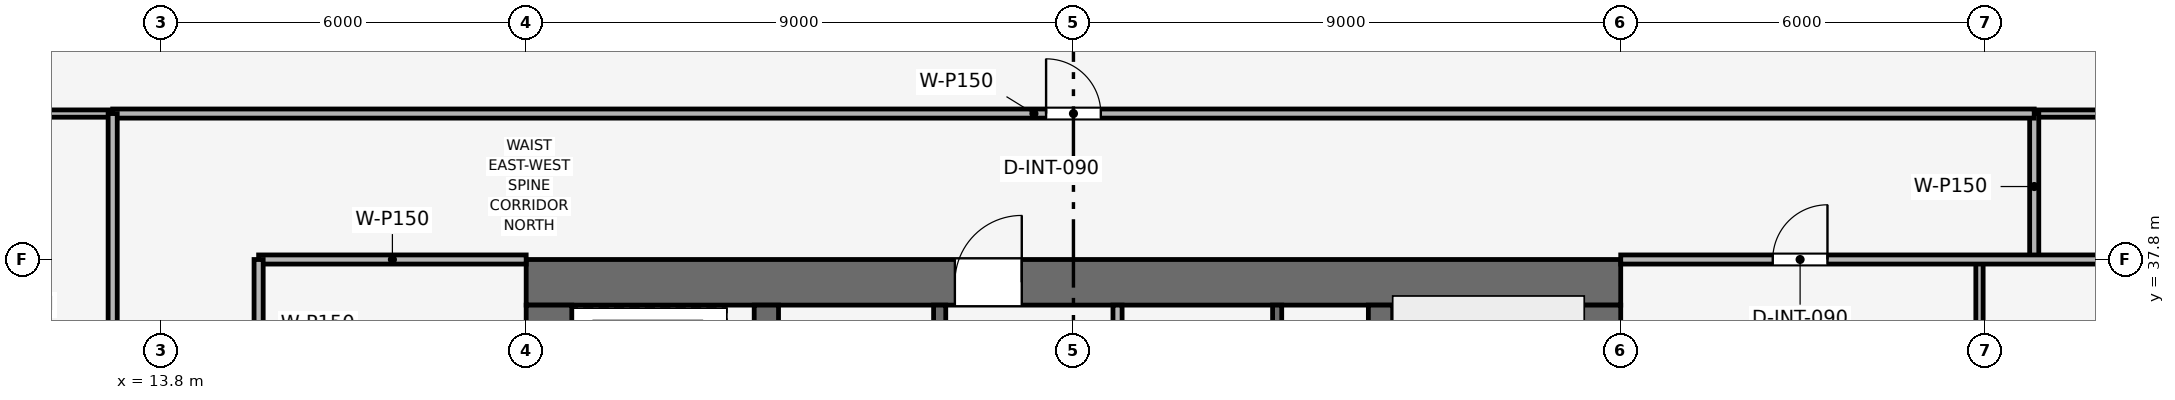
"""IFC4 building model, lengths in metres.
Left out: names, types, materials, properties, quantities, classifications, styles, units other than length and angle.
Written with IfcOpenShell. Run it as: python <this file> out.ifc"""

import sys

from ifc_helpers import new_model, si_unit, direction, frame, frame_2d, origin, place, context, subcontext, project, spatial, rectangle, extrude, element, fill, save


model = new_model("IFC4")
c1 = context("Model", 3, precision=1e-05, world=origin(), true_north=direction((0.0, 1.0)))
c2 = subcontext(c1, "Body", "Model", "MODEL_VIEW")
j1 = project(units=[si_unit("LENGTHUNIT", "METRE"), si_unit("PLANEANGLEUNIT", "RADIAN")], contexts=[c1])
p1 = place(None, origin())
s1 = spatial("IfcSite", under=j1, at=p1, CompositionType="ELEMENT")
p2 = place(p1, origin())
s2 = spatial("IfcBuilding", under=s1, at=p2, CompositionType="ELEMENT")
p3 = place(p2, frame((0.0, 0.0, 214.95)))
s3 = spatial("IfcBuildingStorey", under=s2, at=p3, CompositionType="ELEMENT", Elevation=214.95)
p4 = place(p3, frame((19.8, 37.425, 0.0), z_axis=(0.0, 0.0, 1.0), x_axis=(1.0, 0.0, 0.0)))
e1 = element("IfcWall", 1, at=p4, inside=s3, PredefinedType="SHEAR", context=c2, shape_type="SweptSolid", body=[
    extrude(rectangle(XDim=18.0, YDim=0.75, at=frame_2d((9.0, 0.0))), origin(), (0.0, 0.0, 1.0), 3.75),
])
p5 = place(p4, frame((7.05, 0.0, 0.0)))
e2 = element("IfcOpeningElement", 2, at=p5, cuts=e1, PredefinedType="OPENING", context=c2, shape_type="SweptSolid", body=[
    extrude(rectangle(XDim=1.1, YDim=2.15, at=frame_2d((0.55, 1.075))), frame((0.0, 0.385, 0.0), z_axis=(0.0, -1.0, 0.0), x_axis=(1.0, 0.0, 0.0)), (0.0, 0.0, 1.0), 0.77),
])
p6 = place(p3, frame((20.175, 20.55, 0.0), z_axis=(0.0, 0.0, 1.0), x_axis=(0.0, 1.0, 0.0)))
e3 = element("IfcWall", 3, at=p6, inside=s3, PredefinedType="SHEAR", context=c2, shape_type="SweptSolid", body=[
    extrude(rectangle(XDim=16.5, YDim=0.75, at=frame_2d((8.25, 0.0))), origin(), (0.0, 0.0, 1.0), 3.75),
])
p7 = place(p6, frame((10.25, 0.0, 0.0)))
e4 = element("IfcOpeningElement", 4, at=p7, cuts=e3, PredefinedType="OPENING", context=c2, shape_type="SweptSolid", body=[
    extrude(rectangle(XDim=1.1, YDim=2.15, at=frame_2d((0.55, 1.075))), frame((0.0, 0.385, 0.0), z_axis=(0.0, -1.0, 0.0), x_axis=(1.0, 0.0, 0.0)), (0.0, 0.0, 1.0), 0.77),
])
p8 = place(p3, frame((37.425, 20.55, 0.0), z_axis=(0.0, 0.0, 1.0), x_axis=(0.0, 1.0, 0.0)))
e5 = element("IfcWall", 5, at=p8, inside=s3, PredefinedType="SHEAR", context=c2, shape_type="SweptSolid", body=[
    extrude(rectangle(XDim=16.5, YDim=0.75, at=frame_2d((8.25, 0.0))), origin(), (0.0, 0.0, 1.0), 3.75),
])
p9 = place(p8, frame((4.75, 0.0, 0.0)))
e6 = element("IfcOpeningElement", 6, at=p9, cuts=e5, PredefinedType="OPENING", context=c2, shape_type="SweptSolid", body=[
    extrude(rectangle(XDim=1.1, YDim=2.15, at=frame_2d((0.55, 1.075))), frame((0.0, 0.385, 0.0), z_axis=(0.0, -1.0, 0.0), x_axis=(1.0, 0.0, 0.0)), (0.0, 0.0, 1.0), 0.77),
])
for number, where, z_axis, x_axis in (
    (7, (23.75, 20.55, 0.0), (0.0, 0.0, 1.0), (0.0, 1.0, 0.0)),
    (8, (33.85, 20.55, 0.0), (0.0, 0.0, 1.0), (0.0, 1.0, 0.0)),
):
    element("IfcWall", number, at=place(p3, frame(where, z_axis=z_axis, x_axis=x_axis)), inside=s3, PredefinedType="SHEAR", context=c2, shape_type="SweptSolid", body=[
        extrude(rectangle(XDim=16.5, YDim=0.4, at=frame_2d((8.25, 0.0))), origin(), (0.0, 0.0, 1.0), 3.75),
    ])
p10 = place(p3, frame((32.15, 34.0, 0.0), z_axis=(0.0, 0.0, 1.0), x_axis=(0.0, 1.0, 0.0)))
e9 = element("IfcWall", 9, at=p10, inside=s3, PredefinedType="SHEAR", context=c2, shape_type="SweptSolid", body=[
    extrude(rectangle(XDim=3.05, YDim=0.15, at=frame_2d((1.525, 0.0))), origin(), (0.0, 0.0, 1.0), 3.5),
])
p11 = place(p3, frame((26.6, 34.0, 0.0), z_axis=(0.0, 0.0, 1.0), x_axis=(0.0, 1.0, 0.0)))
e10 = element("IfcWall", 10, at=p11, inside=s3, PredefinedType="SHEAR", context=c2, shape_type="SweptSolid", body=[
    extrude(rectangle(XDim=3.05, YDim=0.2, at=frame_2d((1.525, 0.0))), origin(), (0.0, 0.0, 1.0), 3.5),
])
p12 = place(p11, frame((0.75, 0.0, 0.0)))
e11 = element("IfcOpeningElement", 11, at=p12, cuts=e10, PredefinedType="OPENING", context=c2, shape_type="SweptSolid", body=[
    extrude(rectangle(XDim=1.1, YDim=2.15, at=frame_2d((0.55, 1.075))), frame((0.0, 0.11, 0.0), z_axis=(0.0, -1.0, 0.0), x_axis=(1.0, 0.0, 0.0)), (0.0, 0.0, 1.0), 0.22),
])
p13 = place(p3, frame((29.525, 33.925, 0.0), z_axis=(0.0, 0.0, 1.0), x_axis=(0.0, 1.0, 0.0)))
e12 = element("IfcWall", 12, at=p13, inside=s3, PredefinedType="PARTITIONING", context=c2, shape_type="SweptSolid", body=[
    extrude(rectangle(XDim=3.125, YDim=0.15, at=frame_2d((1.562, 0.0))), origin(), (0.0, 0.0, 1.0), 3.5),
])
p14 = place(p13, frame((0.85, 0.0, 0.0)))
e13 = element("IfcOpeningElement", 13, at=p14, cuts=e12, PredefinedType="OPENING", context=c2, shape_type="SweptSolid", body=[
    extrude(rectangle(XDim=0.9, YDim=2.1, at=frame_2d((0.45, 1.05))), frame((0.0, 0.085, 0.0), z_axis=(0.0, -1.0, 0.0), x_axis=(1.0, 0.0, 0.0)), (0.0, 0.0, 1.0), 0.17),
])
p15 = place(p3, frame((15.4, 37.8, 0.0), z_axis=(0.0, 0.0, 1.0), x_axis=(1.0, 0.0, 0.0)))
e14 = element("IfcWall", 14, at=p15, inside=s3, PredefinedType="PARTITIONING", context=c2, shape_type="SweptSolid", body=[
    extrude(rectangle(XDim=4.4, YDim=0.15, at=frame_2d((2.2, 0.0))), origin(), (0.0, 0.0, 1.0), 3.035),
])
p16 = place(p3, frame((15.4, 32.45, 0.0), z_axis=(0.0, 0.0, 1.0), x_axis=(0.0, 1.0, 0.0)))
e15 = element("IfcWall", 15, at=p16, inside=s3, PredefinedType="PARTITIONING", context=c2, shape_type="SweptSolid", body=[
    extrude(rectangle(XDim=5.35, YDim=0.15, at=frame_2d((2.675, 0.0))), origin(), (0.0, 0.0, 1.0), 3.035),
])
p17 = place(p16, frame((2.1, 0.0, 0.0)))
e16 = element("IfcOpeningElement", 16, at=p17, cuts=e15, PredefinedType="OPENING", context=c2, shape_type="SweptSolid", body=[
    extrude(rectangle(XDim=0.9, YDim=2.1, at=frame_2d((0.45, 1.05))), frame((0.0, 0.085, 0.0), z_axis=(0.0, -1.0, 0.0), x_axis=(1.0, 0.0, 0.0)), (0.0, 0.0, 1.0), 0.17),
])
p18 = place(p3, frame((43.7, 26.85, 0.0), z_axis=(0.0, 0.0, 1.0), x_axis=(0.0, 1.0, 0.0)))
e17 = element("IfcWall", 17, at=p18, inside=s3, PredefinedType="PARTITIONING", context=c2, shape_type="SweptSolid", body=[
    extrude(rectangle(XDim=10.95, YDim=0.12, at=frame_2d((5.475, 0.0))), origin(), (0.0, 0.0, 1.0), 3.035),
])
p19 = place(p18, frame((5.025, 0.0, 0.0)))
e18 = element("IfcOpeningElement", 18, at=p19, cuts=e17, PredefinedType="OPENING", context=c2, shape_type="SweptSolid", body=[
    extrude(rectangle(XDim=0.9, YDim=2.1, at=frame_2d((0.45, 1.05))), frame((0.0, 0.07, 0.0), z_axis=(0.0, -1.0, 0.0), x_axis=(1.0, 0.0, 0.0)), (0.0, 0.0, 1.0), 0.14),
])
p20 = place(p3, frame((1.93, 40.2, 0.0), z_axis=(0.0, 0.0, 1.0), x_axis=(1.0, 0.0, 0.0)))
e19 = element("IfcWall", 19, at=p20, inside=s3, PredefinedType="PARTITIONING", context=c2, shape_type="SweptSolid", body=[
    extrude(rectangle(XDim=11.07, YDim=0.12, at=frame_2d((5.535, 0.0))), origin(), (0.0, 0.0, 1.0), 2.885),
])
p21 = place(p3, frame((44.6, 40.2, 0.0), z_axis=(0.0, 0.0, 1.0), x_axis=(1.0, 0.0, 0.0)))
e20 = element("IfcWall", 20, at=p21, inside=s3, PredefinedType="PARTITIONING", context=c2, shape_type="SweptSolid", body=[
    extrude(rectangle(XDim=11.07, YDim=0.12, at=frame_2d((5.535, 0.0))), origin(), (0.0, 0.0, 1.0), 2.885),
])
p22 = place(p3, frame((44.6, 37.8, 0.0), z_axis=(0.0, 0.0, 1.0), x_axis=(0.0, 1.0, 0.0)))
e21 = element("IfcWall", 21, at=p22, inside=s3, PredefinedType="PARTITIONING", context=c2, shape_type="SweptSolid", body=[
    extrude(rectangle(XDim=2.4, YDim=0.15, at=frame_2d((1.2, 0.0))), origin(), (0.0, 0.0, 1.0), 3.5),
])
p23 = place(p3, frame((37.8, 37.8, 0.0), z_axis=(0.0, 0.0, 1.0), x_axis=(1.0, 0.0, 0.0)))
e22 = element("IfcWall", 22, at=p23, inside=s3, PredefinedType="PARTITIONING", context=c2, shape_type="SweptSolid", body=[
    extrude(rectangle(XDim=17.87, YDim=0.15, at=frame_2d((8.935, 0.0))), origin(), (0.0, 0.0, 1.0), 2.885),
])
p24 = place(p23, frame((2.5, 0.0, 0.0)))
e23 = element("IfcOpeningElement", 23, at=p24, cuts=e22, PredefinedType="OPENING", context=c2, shape_type="SweptSolid", body=[
    extrude(rectangle(XDim=0.9, YDim=2.1, at=frame_2d((0.45, 1.05))), frame((0.0, 0.085, 0.0), z_axis=(0.0, -1.0, 0.0), x_axis=(1.0, 0.0, 0.0)), (0.0, 0.0, 1.0), 0.17),
])
p25 = place(p3, frame((13.0, 40.2, 0.0), z_axis=(0.0, 0.0, 1.0), x_axis=(1.0, 0.0, 0.0)))
e24 = element("IfcWall", 24, at=p25, inside=s3, PredefinedType="PARTITIONING", context=c2, shape_type="SweptSolid", body=[
    extrude(rectangle(XDim=31.6, YDim=0.15, at=frame_2d((15.8, 0.0))), origin(), (0.0, 0.0, 1.0), 3.035),
])
p26 = place(p25, frame((15.35, 0.0, 0.0)))
e25 = element("IfcOpeningElement", 25, at=p26, cuts=e24, PredefinedType="OPENING", context=c2, shape_type="SweptSolid", body=[
    extrude(rectangle(XDim=0.9, YDim=2.1, at=frame_2d((0.45, 1.05))), frame((0.0, 0.085, 0.0), z_axis=(0.0, -1.0, 0.0), x_axis=(1.0, 0.0, 0.0)), (0.0, 0.0, 1.0), 0.17),
])
p27 = place(p3, frame((13.0, 17.4, 0.0), z_axis=(0.0, 0.0, 1.0), x_axis=(0.0, 1.0, 0.0)))
e26 = element("IfcWall", 26, at=p27, inside=s3, PredefinedType="PARTITIONING", context=c2, shape_type="SweptSolid", body=[
    extrude(rectangle(XDim=22.8, YDim=0.15, at=frame_2d((11.4, 0.0))), origin(), (0.0, 0.0, 1.0), 3.035),
])
p28 = place(p27, frame((3.1, 0.0, 0.0)))
e27 = element("IfcOpeningElement", 27, at=p28, cuts=e26, PredefinedType="OPENING", context=c2, shape_type="SweptSolid", body=[
    extrude(rectangle(XDim=0.9, YDim=2.1, at=frame_2d((0.45, 1.05))), frame((0.0, 0.085, 0.0), z_axis=(0.0, -1.0, 0.0), x_axis=(1.0, 0.0, 0.0)), (0.0, 0.0, 1.0), 0.17),
])
p29 = place(p27, frame((6.529, 0.0, 0.0)))
e28 = element("IfcOpeningElement", 28, at=p29, cuts=e26, PredefinedType="OPENING", context=c2, shape_type="SweptSolid", body=[
    extrude(rectangle(XDim=0.9, YDim=2.1, at=frame_2d((0.45, 1.05))), frame((0.0, 0.085, 0.0), z_axis=(0.0, -1.0, 0.0), x_axis=(1.0, 0.0, 0.0)), (0.0, 0.0, 1.0), 0.17),
])
p30 = place(p27, frame((10.957, 0.0, 0.0)))
e29 = element("IfcOpeningElement", 29, at=p30, cuts=e26, PredefinedType="OPENING", context=c2, shape_type="SweptSolid", body=[
    extrude(rectangle(XDim=0.9, YDim=2.1, at=frame_2d((0.45, 1.05))), frame((0.0, 0.085, 0.0), z_axis=(0.0, -1.0, 0.0), x_axis=(1.0, 0.0, 0.0)), (0.0, 0.0, 1.0), 0.17),
])
p31 = place(p27, frame((16.527, 0.0, 0.0)))
e30 = element("IfcOpeningElement", 30, at=p31, cuts=e26, PredefinedType="OPENING", context=c2, shape_type="SweptSolid", body=[
    extrude(rectangle(XDim=0.9, YDim=2.1, at=frame_2d((0.45, 1.05))), frame((0.0, 0.085, 0.0), z_axis=(0.0, -1.0, 0.0), x_axis=(1.0, 0.0, 0.0)), (0.0, 0.0, 1.0), 0.17),
])
p32 = place(p24, origin())
e31 = element("IfcDoor", 31, at=p32, inside=s3, OperationType="SINGLE_SWING_RIGHT", PredefinedType="DOOR", context=c2, shape_type="SweptSolid", body=[
    extrude(rectangle(XDim=0.9, YDim=2.1, at=frame_2d((0.45, 1.05))), frame((0.0, 0.025, 0.0), z_axis=(0.0, -1.0, 0.0), x_axis=(1.0, 0.0, 0.0)), (0.0, 0.0, 1.0), 0.05),
])
fill(e23, e31)
p33 = place(p26, origin())
e32 = element("IfcDoor", 32, at=p33, inside=s3, OperationType="SINGLE_SWING_LEFT", PredefinedType="DOOR", context=c2, shape_type="SweptSolid", body=[
    extrude(rectangle(XDim=0.9, YDim=2.1, at=frame_2d((0.45, 1.05))), frame((0.0, 0.025, 0.0), z_axis=(0.0, -1.0, 0.0), x_axis=(1.0, 0.0, 0.0)), (0.0, 0.0, 1.0), 0.05),
])
fill(e25, e32)
p34 = place(p5, origin())
e33 = element("IfcDoor", 33, at=p34, inside=s3, OperationType="SINGLE_SWING_RIGHT", PredefinedType="DOOR", context=c2, shape_type="SweptSolid", body=[
    extrude(rectangle(XDim=1.1, YDim=2.15, at=frame_2d((0.55, 1.075))), frame((0.0, 0.025, 0.0), z_axis=(0.0, -1.0, 0.0), x_axis=(1.0, 0.0, 0.0)), (0.0, 0.0, 1.0), 0.05),
])
fill(e2, e33)
save(model, sys.argv[1])
